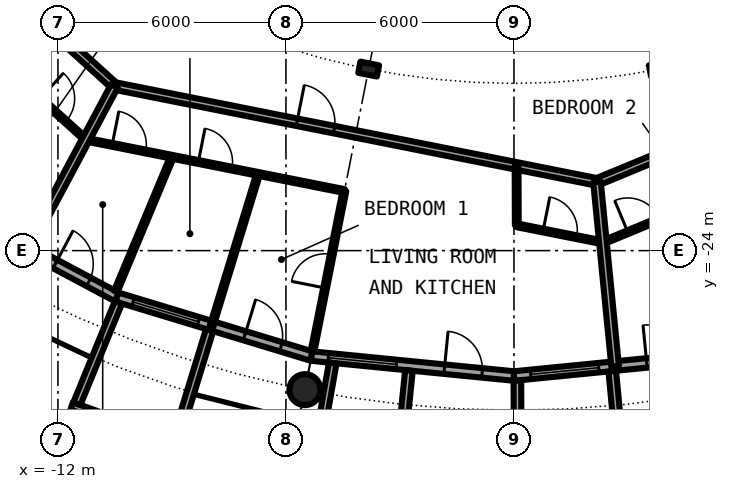
"""IFC4 building model, lengths in metres.
Left out: names, types, materials, properties, quantities, classifications, styles, units other than length and angle.
Written with IfcOpenShell. Run it as: python <this file> out.ifc"""

import sys

from ifc_helpers import new_model, si_unit, direction, frame, frame_2d, origin, origin_2d, place, context, subcontext, project, spatial, rectangle, circle, hollow_circle, i_section, extrude, element, fill, save


model = new_model("IFC4")
c1 = context("Model", 3, precision=1e-05, world=origin(), true_north=direction((0.0, 1.0)))
c2 = subcontext(c1, "Body", "Model", "MODEL_VIEW")
j1 = project(units=[si_unit("LENGTHUNIT", "METRE"), si_unit("PLANEANGLEUNIT", "RADIAN")], contexts=[c1])
p1 = place(None, origin())
s1 = spatial("IfcSite", under=j1, at=p1, CompositionType="ELEMENT")
p2 = place(p1, origin())
s2 = spatial("IfcBuilding", under=s1, at=p2, CompositionType="ELEMENT")
p3 = place(p2, frame((0.0, 0.0, 145.2)))
s3 = spatial("IfcBuildingStorey", under=s2, at=p3, CompositionType="ELEMENT", Elevation=145.2)
p4 = place(p3, frame((-5.501, -27.658, 0.0), z_axis=(0.0, 0.0, 1.0), x_axis=(1.0, 0.0, 0.0)))
e1 = element("IfcColumn", 1, at=p4, inside=s3, PredefinedType="COLUMN", context=c2, shape_type="SweptSolid", body=[
    extrude(hollow_circle(Radius=0.406, WallThickness=0.04, at=origin_2d()), origin(), (0.0, 0.0, 1.0), 3.05),
])
for number, where, z_axis, x_axis in (
    (2, (-3.824, -19.223, 0.0), (0.0, 0.0, 1.0), (-0.195, -0.981, 0.0)),
    (3, (3.824, -19.223, 0.0), (0.0, 0.0, 1.0), (0.195, -0.981, 0.0)),
):
    element("IfcColumn", number, at=place(p3, frame(where, z_axis=z_axis, x_axis=x_axis)), inside=s3, PredefinedType="COLUMN", context=c2, shape_type="SweptSolid", body=[
        extrude(i_section(OverallWidth=0.3, OverallDepth=0.5, WebThickness=0.014, FlangeThickness=0.028, FilletRadius=0.027, at=origin_2d()), origin(), (0.0, 0.0, 1.0), 3.05),
    ])
p5 = place(p3, frame((-15.167, -22.699, 0.0), z_axis=(0.0, 0.0, 1.0), x_axis=(0.881915646801, -0.471407246368, 0.0)))
e4 = element("IfcWall", 4, at=p5, inside=s3, PredefinedType="SOLIDWALL", context=c2, shape_type="SweptSolid", body=[
    extrude(rectangle(XDim=5.352, YDim=0.25, at=frame_2d((2.676, 0.0))), origin(), (0.0, 0.0, 1.0), 2.7),
])
p6 = place(p5, frame((0.441, 0.0, 0.3)))
e5 = element("IfcOpeningElement", 5, at=p6, cuts=e4, PredefinedType="OPENING", context=c2, shape_type="SweptSolid", body=[
    extrude(rectangle(XDim=1.8, YDim=2.1, at=frame_2d((0.9, 1.05))), frame((0.0, 0.135, 0.0), z_axis=(0.0, -1.0, 0.0), x_axis=(1.0, 0.0, 0.0)), (0.0, 0.0, 1.0), 0.27),
])
p7 = place(p5, frame((3.51, 0.0, 0.0)))
e6 = element("IfcOpeningElement", 6, at=p7, cuts=e4, PredefinedType="OPENING", context=c2, shape_type="SweptSolid", body=[
    extrude(rectangle(XDim=1.0, YDim=2.2, at=frame_2d((0.5, 1.1))), frame((0.0, 0.135, 0.0), z_axis=(0.0, -1.0, 0.0), x_axis=(1.0, 0.0, 0.0)), (0.0, 0.0, 1.0), 0.27),
])
p8 = place(p3, frame((-10.447, -25.222, 0.0), z_axis=(0.0, 0.0, 1.0), x_axis=(0.956965678721, -0.290201119486, 0.0)))
e7 = element("IfcWall", 7, at=p8, inside=s3, PredefinedType="SOLIDWALL", context=c2, shape_type="SweptSolid", body=[
    extrude(rectangle(XDim=5.351, YDim=0.25, at=frame_2d((2.676, 0.0))), origin(), (0.0, 0.0, 1.0), 2.7),
])
p9 = place(p8, frame((0.441, 0.0, 0.3)))
e8 = element("IfcOpeningElement", 8, at=p9, cuts=e7, PredefinedType="OPENING", context=c2, shape_type="SweptSolid", body=[
    extrude(rectangle(XDim=1.8, YDim=2.1, at=frame_2d((0.9, 1.05))), frame((0.0, 0.135, 0.0), z_axis=(0.0, -1.0, 0.0), x_axis=(1.0, 0.0, 0.0)), (0.0, 0.0, 1.0), 0.27),
])
p10 = place(p8, frame((3.51, 0.0, 0.0)))
e9 = element("IfcOpeningElement", 9, at=p10, cuts=e7, PredefinedType="OPENING", context=c2, shape_type="SweptSolid", body=[
    extrude(rectangle(XDim=1.0, YDim=2.2, at=frame_2d((0.5, 1.1))), frame((0.0, 0.135, 0.0), z_axis=(0.0, -1.0, 0.0), x_axis=(1.0, 0.0, 0.0)), (0.0, 0.0, 1.0), 0.27),
])
p11 = place(p3, frame((-11.638, -28.084, -0.03), z_axis=(0.0, 0.0, 1.0), x_axis=(0.941461077774, -0.337121697664, 0.0)))
e10 = element("IfcWall", 10, at=p11, inside=s3, PredefinedType="SOLIDWALL", context=c2, shape_type="SweptSolid", body=[
    extrude(rectangle(XDim=2.993, YDim=0.2, at=frame_2d((1.497, 0.0))), origin(), (0.0, 0.0, 1.0), 2.73),
])
p12 = place(p11, frame((0.457, 0.0, 0.33)))
e11 = element("IfcOpeningElement", 11, at=p12, cuts=e10, PredefinedType="OPENING", context=c2, shape_type="SweptSolid", body=[
    extrude(circle(Radius=1.04, at=frame_2d((1.04, 1.04))), frame((0.0, 0.11, 0.0), z_axis=(0.0, -1.0, 0.0), x_axis=(1.0, 0.0, 0.0)), (0.0, 0.0, 1.0), 0.22),
])
p13 = place(p3, frame((-10.409, -25.364, -0.03), z_axis=(0.0, 0.0, 1.0), x_axis=(-0.379509886562, -0.925187681501, 0.0)))
e12 = element("IfcWall", 12, at=p13, inside=s3, PredefinedType="SOLIDWALL", context=c2, shape_type="SweptSolid", body=[
    extrude(rectangle(XDim=2.883, YDim=0.2, at=frame_2d((1.441, 0.0))), origin(), (0.0, 0.0, 1.0), 2.73),
])
p14 = place(p3, frame((-8.009, -26.092, -0.03), z_axis=(0.0, 0.0, 1.0), x_axis=(-0.293406695073, -0.955987715029, 0.0)))
e13 = element("IfcWall", 13, at=p14, inside=s3, PredefinedType="SOLIDWALL", context=c2, shape_type="SweptSolid", body=[
    extrude(rectangle(XDim=3.006, YDim=0.2, at=frame_2d((1.503, 0.0))), origin(), (0.0, 0.0, 1.0), 2.73),
])
p15 = place(p3, frame((-5.326, -26.775, 0.0), z_axis=(0.0, 0.0, 1.0), x_axis=(0.995173996315, -0.098126026407, 0.0)))
e14 = element("IfcWall", 14, at=p15, inside=s3, PredefinedType="SOLIDWALL", context=c2, shape_type="SweptSolid", body=[
    extrude(rectangle(XDim=5.352, YDim=0.25, at=frame_2d((2.676, 0.0))), origin(), (0.0, 0.0, 1.0), 2.7),
])
p16 = place(p15, frame((0.441, 0.0, 0.3)))
e15 = element("IfcOpeningElement", 15, at=p16, cuts=e14, PredefinedType="OPENING", context=c2, shape_type="SweptSolid", body=[
    extrude(rectangle(XDim=1.8, YDim=2.1, at=frame_2d((0.9, 1.05))), frame((0.0, 0.135, 0.0), z_axis=(0.0, -1.0, 0.0), x_axis=(1.0, 0.0, 0.0)), (0.0, 0.0, 1.0), 0.27),
])
p17 = place(p15, frame((3.51, 0.0, 0.0)))
e16 = element("IfcOpeningElement", 16, at=p17, cuts=e14, PredefinedType="OPENING", context=c2, shape_type="SweptSolid", body=[
    extrude(rectangle(XDim=1.0, YDim=2.2, at=frame_2d((0.5, 1.1))), frame((0.0, 0.135, 0.0), z_axis=(0.0, -1.0, 0.0), x_axis=(1.0, 0.0, 0.0)), (0.0, 0.0, 1.0), 0.27),
])
p18 = place(p3, frame((-4.769, -26.956, -0.03), z_axis=(0.0, 0.0, 1.0), x_axis=(-0.174056778901, -0.984735618183, 0.0)))
e17 = element("IfcWall", 17, at=p18, inside=s3, PredefinedType="SOLIDWALL", context=c2, shape_type="SweptSolid", body=[
    extrude(rectangle(XDim=2.925, YDim=0.2, at=frame_2d((1.462, 0.0))), origin(), (0.0, 0.0, 1.0), 2.73),
])
p19 = place(p3, frame((-2.764, -27.153, -0.03), z_axis=(0.0, 0.0, 1.0), x_axis=(-0.101505487237, -0.994834979311, 0.0)))
e18 = element("IfcWall", 18, at=p19, inside=s3, PredefinedType="SOLIDWALL", context=c2, shape_type="SweptSolid", body=[
    extrude(rectangle(XDim=3.007, YDim=0.2, at=frame_2d((1.503, 0.0))), origin(), (0.0, 0.0, 1.0), 2.73),
])
p20 = place(p3, frame((0.0, -27.3, 0.0), z_axis=(0.0, 0.0, 1.0), x_axis=(0.995173996315, 0.098126026407, 0.0)))
e19 = element("IfcWall", 19, at=p20, inside=s3, PredefinedType="SOLIDWALL", context=c2, shape_type="SweptSolid", body=[
    extrude(rectangle(XDim=5.352, YDim=0.25, at=frame_2d((2.676, 0.0))), origin(), (0.0, 0.0, 1.0), 2.7),
])
p21 = place(p20, frame((0.441, 0.0, 0.3)))
e20 = element("IfcOpeningElement", 20, at=p21, cuts=e19, PredefinedType="OPENING", context=c2, shape_type="SweptSolid", body=[
    extrude(rectangle(XDim=1.8, YDim=2.1, at=frame_2d((0.9, 1.05))), frame((0.0, 0.135, 0.0), z_axis=(0.0, -1.0, 0.0), x_axis=(1.0, 0.0, 0.0)), (0.0, 0.0, 1.0), 0.27),
])
p22 = place(p20, frame((3.51, 0.0, 0.0)))
e21 = element("IfcOpeningElement", 21, at=p22, cuts=e19, PredefinedType="OPENING", context=c2, shape_type="SweptSolid", body=[
    extrude(rectangle(XDim=1.0, YDim=2.2, at=frame_2d((0.5, 1.1))), frame((0.0, 0.135, 0.0), z_axis=(0.0, -1.0, 0.0), x_axis=(1.0, 0.0, 0.0)), (0.0, 0.0, 1.0), 0.27),
])
p23 = place(p3, frame((0.09, -27.417, -0.03), z_axis=(0.0, 0.0, 1.0), x_axis=(0.00347308367, -0.999993968827, 0.0)))
e22 = element("IfcWall", 22, at=p23, inside=s3, PredefinedType="SOLIDWALL", context=c2, shape_type="SweptSolid", body=[
    extrude(rectangle(XDim=2.882, YDim=0.2, at=frame_2d((1.441, 0.0))), origin(), (0.0, 0.0, 1.0), 2.73),
])
p24 = place(p3, frame((2.586, -27.171, -0.03), z_axis=(0.0, 0.0, 1.0), x_axis=(0.094548432284, -0.995520262954, 0.0)))
e23 = element("IfcWall", 23, at=p24, inside=s3, PredefinedType="SOLIDWALL", context=c2, shape_type="SweptSolid", body=[
    extrude(rectangle(XDim=3.006, YDim=0.2, at=frame_2d((1.503, 0.0))), origin(), (0.0, 0.0, 1.0), 2.73),
])
p25 = place(p3, frame((-16.432, -16.396, 0.0), z_axis=(0.0, 0.0, 1.0), x_axis=(0.740901429238, -0.671613781986, 0.0)))
e24 = element("IfcWall", 24, at=p25, inside=s3, PredefinedType="PARTITIONING", context=c2, shape_type="SweptSolid", body=[
    extrude(rectangle(XDim=6.97, YDim=0.1, at=frame_2d((3.485, 0.0))), origin(), (0.0, 0.0, 1.0), 2.7),
])
p26 = place(p25, frame((3.038, 0.0, 0.0)))
e25 = element("IfcOpeningElement", 25, at=p26, cuts=e24, PredefinedType="OPENING", context=c2, shape_type="SweptSolid", body=[
    extrude(rectangle(XDim=0.9, YDim=2.3, at=frame_2d((0.45, 1.15))), frame((0.0, 0.06, 0.0), z_axis=(0.0, -1.0, 0.0), x_axis=(1.0, 0.0, 0.0)), (0.0, 0.0, 1.0), 0.12),
])
p27 = place(p25, frame((5.36, 0.0, 0.0)))
e26 = element("IfcOpeningElement", 26, at=p27, cuts=e24, PredefinedType="OPENING", context=c2, shape_type="SweptSolid", body=[
    extrude(rectangle(XDim=0.9, YDim=2.3, at=frame_2d((0.45, 1.15))), frame((0.0, 0.06, 0.0), z_axis=(0.0, -1.0, 0.0), x_axis=(1.0, 0.0, 0.0)), (0.0, 0.0, 1.0), 0.12),
])
p28 = place(p3, frame((-11.264, -21.08, 0.0), z_axis=(0.0, 0.0, 1.0), x_axis=(0.980795304313, -0.195039921651, 0.0)))
e27 = element("IfcWall", 27, at=p28, inside=s3, PredefinedType="PARTITIONING", context=c2, shape_type="SweptSolid", body=[
    extrude(rectangle(XDim=6.937, YDim=0.1, at=frame_2d((3.469, 0.0))), origin(), (0.0, 0.0, 1.0), 2.7),
])
p29 = place(p28, frame((3.016, 0.0, 0.0)))
e28 = element("IfcOpeningElement", 28, at=p29, cuts=e27, PredefinedType="OPENING", context=c2, shape_type="SweptSolid", body=[
    extrude(rectangle(XDim=0.9, YDim=2.3, at=frame_2d((0.45, 1.15))), frame((0.0, 0.06, 0.0), z_axis=(0.0, -1.0, 0.0), x_axis=(1.0, 0.0, 0.0)), (0.0, 0.0, 1.0), 0.12),
])
p30 = place(p28, frame((0.704, 0.0, 0.0)))
e29 = element("IfcOpeningElement", 29, at=p30, cuts=e27, PredefinedType="OPENING", context=c2, shape_type="SweptSolid", body=[
    extrude(rectangle(XDim=0.9, YDim=2.3, at=frame_2d((0.45, 1.15))), frame((0.0, 0.06, 0.0), z_axis=(0.0, -1.0, 0.0), x_axis=(1.0, 0.0, 0.0)), (0.0, 0.0, 1.0), 0.12),
])
p31 = place(p3, frame((0.074, -23.334, 0.0), z_axis=(0.0, 0.0, 1.0), x_axis=(0.98081942231, -0.194918600496, 0.0)))
e30 = element("IfcWall", 30, at=p31, inside=s3, PredefinedType="PARTITIONING", context=c2, shape_type="SweptSolid", body=[
    extrude(rectangle(XDim=2.313, YDim=0.1, at=frame_2d((1.157, 0.0))), origin(), (0.0, 0.0, 1.0), 2.7),
])
p32 = place(p31, frame((0.707, 0.0, 0.0)))
e31 = element("IfcOpeningElement", 31, at=p32, cuts=e30, PredefinedType="OPENING", context=c2, shape_type="SweptSolid", body=[
    extrude(rectangle(XDim=0.9, YDim=2.3, at=frame_2d((0.45, 1.15))), frame((0.0, 0.06, 0.0), z_axis=(0.0, -1.0, 0.0), x_axis=(1.0, 0.0, 0.0)), (0.0, 0.0, 1.0), 0.12),
])
p33 = place(p3, frame((2.342, -23.785, 0.0), z_axis=(0.0, 0.0, 1.0), x_axis=(0.92388173557, 0.382678113667, 0.0)))
e32 = element("IfcWall", 32, at=p33, inside=s3, PredefinedType="PARTITIONING", context=c2, shape_type="SweptSolid", body=[
    extrude(rectangle(XDim=6.938, YDim=0.1, at=frame_2d((3.469, 0.0))), origin(), (0.0, 0.0, 1.0), 2.7),
])
p34 = place(p33, frame((3.021, 0.0, 0.0)))
e33 = element("IfcOpeningElement", 33, at=p34, cuts=e32, PredefinedType="OPENING", context=c2, shape_type="SweptSolid", body=[
    extrude(rectangle(XDim=0.9, YDim=2.3, at=frame_2d((0.45, 1.15))), frame((0.0, 0.06, 0.0), z_axis=(0.0, -1.0, 0.0), x_axis=(1.0, 0.0, 0.0)), (0.0, 0.0, 1.0), 0.12),
])
p35 = place(p33, frame((0.707, 0.0, 0.0)))
e34 = element("IfcOpeningElement", 34, at=p35, cuts=e32, PredefinedType="OPENING", context=c2, shape_type="SweptSolid", body=[
    extrude(rectangle(XDim=0.9, YDim=2.3, at=frame_2d((0.45, 1.15))), frame((0.0, 0.06, 0.0), z_axis=(0.0, -1.0, 0.0), x_axis=(1.0, 0.0, 0.0)), (0.0, 0.0, 1.0), 0.12),
])
p36 = place(p3, frame((-18.542, -12.389, 0.0), z_axis=(0.0, 0.0, 1.0), x_axis=(0.740947367223, -0.671563101283, 0.0)))
e35 = element("IfcWall", 35, at=p36, inside=s3, PredefinedType="PARTITIONING", context=c2, shape_type="SweptSolid", body=[
    extrude(rectangle(XDim=10.837, YDim=0.2, at=frame_2d((5.419, 0.0))), origin(), (0.0, 0.0, 1.0), 2.7),
])
p37 = place(p36, frame((6.002, 0.0, 0.0)))
e36 = element("IfcOpeningElement", 36, at=p37, cuts=e35, PredefinedType="OPENING", context=c2, shape_type="SweptSolid", body=[
    extrude(rectangle(XDim=1.0, YDim=2.3, at=frame_2d((0.5, 1.15))), frame((0.0, 0.11, 0.0), z_axis=(0.0, -1.0, 0.0), x_axis=(1.0, 0.0, 0.0)), (0.0, 0.0, 1.0), 0.22),
])
p38 = place(p3, frame((-10.512, -19.667, 0.0), z_axis=(0.0, 0.0, 1.0), x_axis=(0.980780341017, -0.195115152343, 0.0)))
e37 = element("IfcWall", 37, at=p38, inside=s3, PredefinedType="PARTITIONING", context=c2, shape_type="SweptSolid", body=[
    extrude(rectangle(XDim=12.947, YDim=0.2, at=frame_2d((6.473, 0.0))), origin(), (0.0, 0.0, 1.0), 2.7),
])
p39 = place(p38, frame((4.894, 0.0, 0.0)))
e38 = element("IfcOpeningElement", 38, at=p39, cuts=e37, PredefinedType="OPENING", context=c2, shape_type="SweptSolid", body=[
    extrude(rectangle(XDim=1.0, YDim=2.3, at=frame_2d((0.5, 1.15))), frame((0.0, 0.11, 0.0), z_axis=(0.0, -1.0, 0.0), x_axis=(1.0, 0.0, 0.0)), (0.0, 0.0, 1.0), 0.22),
])
p40 = place(p3, frame((2.186, -22.193, 0.0), z_axis=(0.0, 0.0, 1.0), x_axis=(0.923860535822, 0.382729291212, 0.0)))
e39 = element("IfcWall", 39, at=p40, inside=s3, PredefinedType="PARTITIONING", context=c2, shape_type="SweptSolid", body=[
    extrude(rectangle(XDim=12.947, YDim=0.2, at=frame_2d((6.473, 0.0))), origin(), (0.0, 0.0, 1.0), 2.7),
])
p41 = place(p40, frame((4.894, 0.0, 0.0)))
e40 = element("IfcOpeningElement", 40, at=p41, cuts=e39, PredefinedType="OPENING", context=c2, shape_type="SweptSolid", body=[
    extrude(rectangle(XDim=1.0, YDim=2.3, at=frame_2d((0.5, 1.15))), frame((0.0, 0.11, 0.0), z_axis=(0.0, -1.0, 0.0), x_axis=(1.0, 0.0, 0.0)), (0.0, 0.0, 1.0), 0.22),
])
p42 = place(p3, frame((-12.81, -23.966, 0.0), z_axis=(0.0, 0.0, 1.0), x_axis=(0.471427642527, 0.881904744211, 0.0)))
e41 = element("IfcWall", 41, at=p42, inside=s3, PredefinedType="PARTITIONING", context=c2, shape_type="SweptSolid", body=[
    extrude(rectangle(XDim=4.875, YDim=0.2, at=frame_2d((2.438, 0.0))), origin(), (0.0, 0.0, 1.0), 2.7),
])
p43 = place(p3, frame((-10.479, -25.073, 0.0), z_axis=(0.0, 0.0, 1.0), x_axis=(0.385572005139, 0.922677749192, 0.0)))
e42 = element("IfcWall", 42, at=p43, inside=s3, PredefinedType="PARTITIONING", context=c2, shape_type="SweptSolid", body=[
    extrude(rectangle(XDim=3.841, YDim=0.1, at=frame_2d((1.92, 0.0))), origin(), (0.0, 0.0, 1.0), 2.7),
])
p44 = place(p3, frame((-7.956, -25.984, 0.0), z_axis=(0.0, 0.0, 1.0), x_axis=(0.292799128207, 0.956173975028, 0.0)))
e43 = element("IfcWall", 43, at=p44, inside=s3, PredefinedType="PARTITIONING", context=c2, shape_type="SweptSolid", body=[
    extrude(rectangle(XDim=4.188, YDim=0.1, at=frame_2d((2.094, 0.0))), origin(), (0.0, 0.0, 1.0), 2.7),
])
p45 = place(p3, frame((-5.302, -26.653, 0.0), z_axis=(0.0, 0.0, 1.0), x_axis=(0.195145394338, 0.98077432423, 0.0)))
e44 = element("IfcWall", 44, at=p45, inside=s3, PredefinedType="PARTITIONING", context=c2, shape_type="SweptSolid", body=[
    extrude(rectangle(XDim=4.305, YDim=0.1, at=frame_2d((2.152, 0.0))), origin(), (0.0, 0.0, 1.0), 2.7),
])
p46 = place(p45, frame((1.702, 0.0, 0.0)))
e45 = element("IfcOpeningElement", 45, at=p46, cuts=e44, PredefinedType="OPENING", context=c2, shape_type="SweptSolid", body=[
    extrude(rectangle(XDim=0.9, YDim=2.3, at=frame_2d((0.45, 1.15))), frame((0.0, 0.06, 0.0), z_axis=(0.0, -1.0, 0.0), x_axis=(1.0, 0.0, 0.0)), (0.0, 0.0, 1.0), 0.12),
])
p47 = place(p3, frame((0.074, -23.334, 0.0), z_axis=(0.0, 0.0, 1.0), x_axis=(-0.003125961595, 0.99999511417, 0.0)))
e46 = element("IfcWall", 46, at=p47, inside=s3, PredefinedType="PARTITIONING", context=c2, shape_type="SweptSolid", body=[
    extrude(rectangle(XDim=1.562, YDim=0.1, at=frame_2d((0.781, 0.0))), origin(), (0.0, 0.0, 1.0), 2.7),
])
p48 = place(p3, frame((2.184, -22.193, 0.0), z_axis=(0.0, 0.0, 1.0), x_axis=(0.098070432075, -0.995179476453, 0.0)))
e47 = element("IfcWall", 47, at=p48, inside=s3, PredefinedType="PARTITIONING", context=c2, shape_type="SweptSolid", body=[
    extrude(rectangle(XDim=4.874, YDim=0.2, at=frame_2d((2.437, 0.0))), origin(), (0.0, 0.0, 1.0), 2.7),
])
p49 = place(p7, origin())
e48 = element("IfcDoor", 48, at=p49, inside=s3, OperationType="SINGLE_SWING_LEFT", PredefinedType="DOOR", context=c2, shape_type="SweptSolid", body=[
    extrude(rectangle(XDim=1.0, YDim=2.2, at=frame_2d((0.5, 1.1))), frame((0.0, 0.025, 0.0), z_axis=(0.0, -1.0, 0.0), x_axis=(1.0, 0.0, 0.0)), (0.0, 0.0, 1.0), 0.05),
])
fill(e6, e48)
p50 = place(p9, origin())
e49 = element("IfcWindow", 49, at=p50, inside=s3, PartitioningType="SINGLE_PANEL", PredefinedType="WINDOW", context=c2, shape_type="SweptSolid", body=[
    extrude(rectangle(XDim=1.8, YDim=2.1, at=frame_2d((0.9, 1.05))), frame((0.0, 0.03, 0.0), z_axis=(0.0, -1.0, 0.0), x_axis=(1.0, 0.0, 0.0)), (0.0, 0.0, 1.0), 0.06),
])
fill(e8, e49)
p51 = place(p10, origin())
e50 = element("IfcDoor", 50, at=p51, inside=s3, OperationType="SINGLE_SWING_LEFT", PredefinedType="DOOR", context=c2, shape_type="SweptSolid", body=[
    extrude(rectangle(XDim=1.0, YDim=2.2, at=frame_2d((0.5, 1.1))), frame((0.0, 0.025, 0.0), z_axis=(0.0, -1.0, 0.0), x_axis=(1.0, 0.0, 0.0)), (0.0, 0.0, 1.0), 0.05),
])
fill(e9, e50)
p52 = place(p16, origin())
e51 = element("IfcWindow", 51, at=p52, inside=s3, PartitioningType="SINGLE_PANEL", PredefinedType="WINDOW", context=c2, shape_type="SweptSolid", body=[
    extrude(rectangle(XDim=1.8, YDim=2.1, at=frame_2d((0.9, 1.05))), frame((0.0, 0.03, 0.0), z_axis=(0.0, -1.0, 0.0), x_axis=(1.0, 0.0, 0.0)), (0.0, 0.0, 1.0), 0.06),
])
fill(e15, e51)
p53 = place(p17, origin())
e52 = element("IfcDoor", 52, at=p53, inside=s3, OperationType="SINGLE_SWING_LEFT", PredefinedType="DOOR", context=c2, shape_type="SweptSolid", body=[
    extrude(rectangle(XDim=1.0, YDim=2.2, at=frame_2d((0.5, 1.1))), frame((0.0, 0.025, 0.0), z_axis=(0.0, -1.0, 0.0), x_axis=(1.0, 0.0, 0.0)), (0.0, 0.0, 1.0), 0.05),
])
fill(e16, e52)
p54 = place(p21, origin())
e53 = element("IfcWindow", 53, at=p54, inside=s3, PartitioningType="SINGLE_PANEL", PredefinedType="WINDOW", context=c2, shape_type="SweptSolid", body=[
    extrude(rectangle(XDim=1.8, YDim=2.1, at=frame_2d((0.9, 1.05))), frame((0.0, 0.03, 0.0), z_axis=(0.0, -1.0, 0.0), x_axis=(1.0, 0.0, 0.0)), (0.0, 0.0, 1.0), 0.06),
])
fill(e20, e53)
p55 = place(p22, origin())
e54 = element("IfcDoor", 54, at=p55, inside=s3, OperationType="SINGLE_SWING_LEFT", PredefinedType="DOOR", context=c2, shape_type="SweptSolid", body=[
    extrude(rectangle(XDim=1.0, YDim=2.2, at=frame_2d((0.5, 1.1))), frame((0.0, 0.025, 0.0), z_axis=(0.0, -1.0, 0.0), x_axis=(1.0, 0.0, 0.0)), (0.0, 0.0, 1.0), 0.05),
])
fill(e21, e54)
p56 = place(p27, origin())
e55 = element("IfcDoor", 55, at=p56, inside=s3, OperationType="SINGLE_SWING_RIGHT", PredefinedType="DOOR", context=c2, shape_type="SweptSolid", body=[
    extrude(rectangle(XDim=0.9, YDim=2.3, at=frame_2d((0.45, 1.15))), frame((0.0, 0.025, 0.0), z_axis=(0.0, -1.0, 0.0), x_axis=(1.0, 0.0, 0.0)), (0.0, 0.0, 1.0), 0.05),
])
fill(e26, e55)
p57 = place(p39, origin())
e56 = element("IfcDoor", 56, at=p57, inside=s3, OperationType="SINGLE_SWING_LEFT", PredefinedType="DOOR", context=c2, shape_type="SweptSolid", body=[
    extrude(rectangle(XDim=1.0, YDim=2.3, at=frame_2d((0.5, 1.15))), frame((0.0, 0.025, 0.0), z_axis=(0.0, -1.0, 0.0), x_axis=(1.0, 0.0, 0.0)), (0.0, 0.0, 1.0), 0.05),
])
fill(e38, e56)
p58 = place(p32, origin())
e57 = element("IfcDoor", 57, at=p58, inside=s3, OperationType="SINGLE_SWING_RIGHT", PredefinedType="DOOR", context=c2, shape_type="SweptSolid", body=[
    extrude(rectangle(XDim=0.9, YDim=2.3, at=frame_2d((0.45, 1.15))), frame((0.0, 0.025, 0.0), z_axis=(0.0, -1.0, 0.0), x_axis=(1.0, 0.0, 0.0)), (0.0, 0.0, 1.0), 0.05),
])
fill(e31, e57)
p59 = place(p46, origin())
e58 = element("IfcDoor", 58, at=p59, inside=s3, OperationType="SINGLE_SWING_LEFT", PredefinedType="DOOR", context=c2, shape_type="SweptSolid", body=[
    extrude(rectangle(XDim=0.9, YDim=2.3, at=frame_2d((0.45, 1.15))), frame((0.0, 0.025, 0.0), z_axis=(0.0, -1.0, 0.0), x_axis=(1.0, 0.0, 0.0)), (0.0, 0.0, 1.0), 0.05),
])
fill(e45, e58)
p60 = place(p29, origin())
e59 = element("IfcDoor", 59, at=p60, inside=s3, OperationType="SINGLE_SWING_LEFT", PredefinedType="DOOR", context=c2, shape_type="SweptSolid", body=[
    extrude(rectangle(XDim=0.9, YDim=2.3, at=frame_2d((0.45, 1.15))), frame((0.0, 0.025, 0.0), z_axis=(0.0, -1.0, 0.0), x_axis=(1.0, 0.0, 0.0)), (0.0, 0.0, 1.0), 0.05),
])
fill(e28, e59)
p61 = place(p30, origin())
e60 = element("IfcDoor", 60, at=p61, inside=s3, OperationType="SINGLE_SWING_LEFT", PredefinedType="DOOR", context=c2, shape_type="SweptSolid", body=[
    extrude(rectangle(XDim=0.9, YDim=2.3, at=frame_2d((0.45, 1.15))), frame((0.0, 0.025, 0.0), z_axis=(0.0, -1.0, 0.0), x_axis=(1.0, 0.0, 0.0)), (0.0, 0.0, 1.0), 0.05),
])
fill(e29, e60)
p62 = place(p35, origin())
e61 = element("IfcDoor", 61, at=p62, inside=s3, OperationType="SINGLE_SWING_LEFT", PredefinedType="DOOR", context=c2, shape_type="SweptSolid", body=[
    extrude(rectangle(XDim=0.9, YDim=2.3, at=frame_2d((0.45, 1.15))), frame((0.0, 0.025, 0.0), z_axis=(0.0, -1.0, 0.0), x_axis=(1.0, 0.0, 0.0)), (0.0, 0.0, 1.0), 0.05),
])
fill(e34, e61)
save(model, sys.argv[1])
